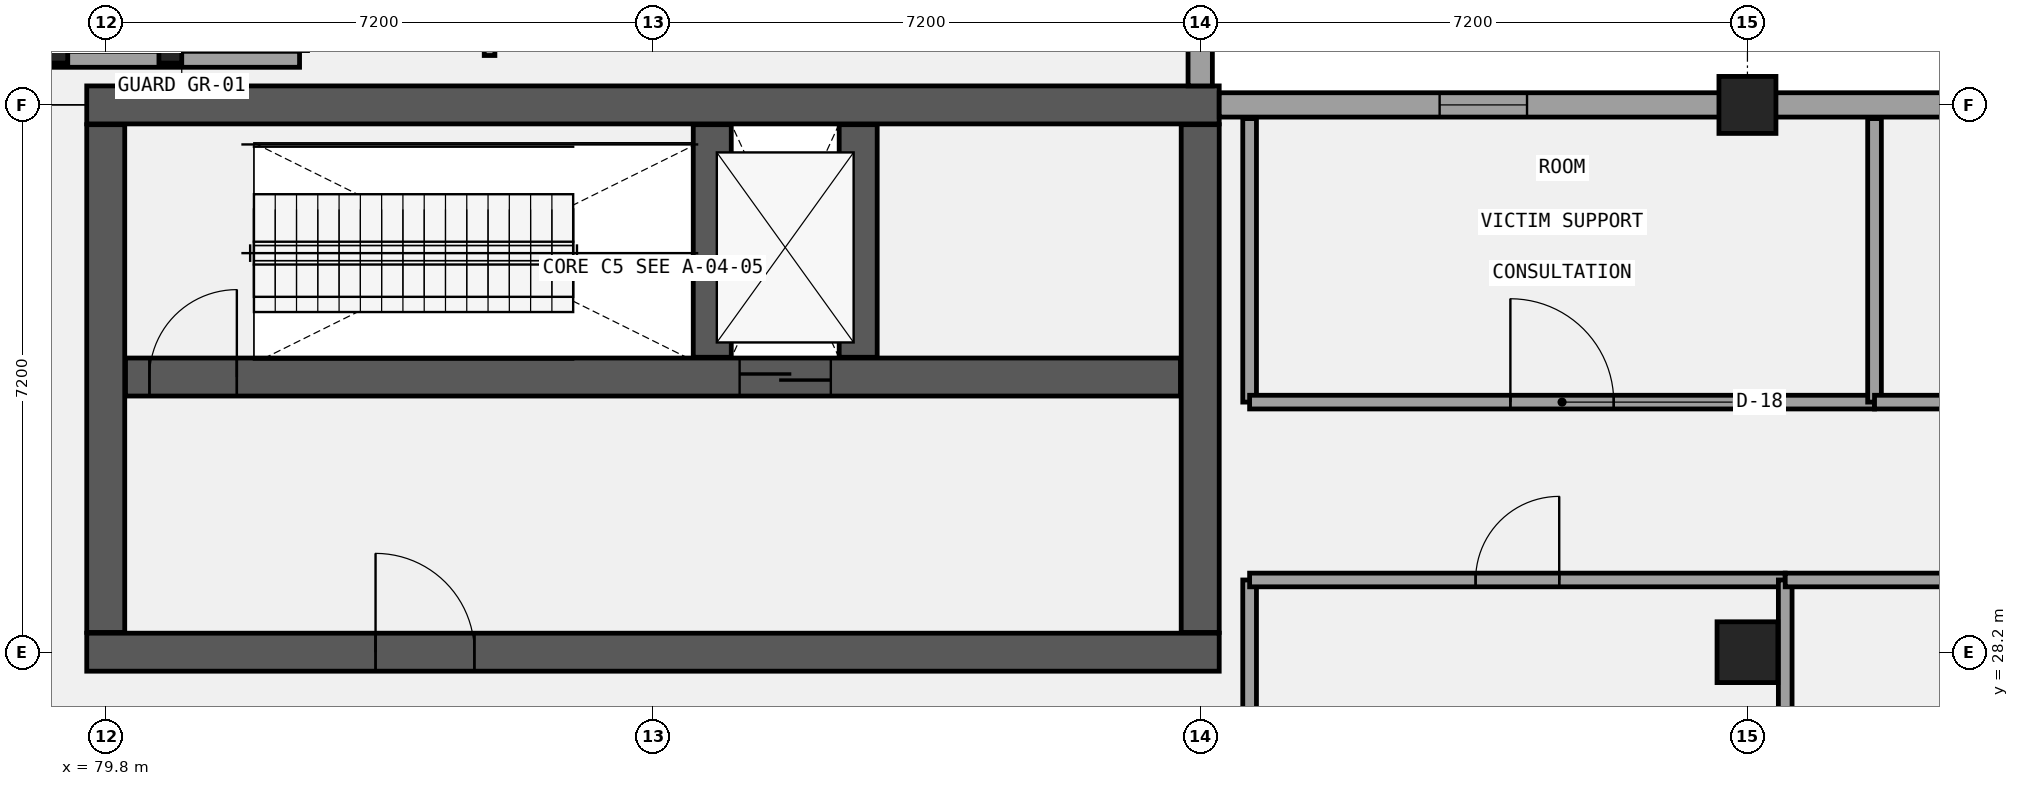
"""IFC4 building model, lengths in metres.
Left out: names, types, materials, properties, quantities, classifications, styles, units other than length and angle.
Written with IfcOpenShell. Run it as: python <this file> out.ifc"""

import sys

from ifc_helpers import new_model, si_unit, direction, frame, frame_2d, origin, origin_2d, place, context, subcontext, project, spatial, rectangle, i_section, extrude, element, fill, save


model = new_model("IFC4")
c1 = context("Model", 3, precision=1e-05, world=origin(), true_north=direction((0.0, 1.0)))
c2 = subcontext(c1, "Body", "Model", "MODEL_VIEW")
j1 = project(units=[si_unit("LENGTHUNIT", "METRE"), si_unit("PLANEANGLEUNIT", "RADIAN")], contexts=[c1])
p1 = place(None, origin())
s1 = spatial("IfcSite", under=j1, at=p1, CompositionType="ELEMENT")
p2 = place(p1, origin())
s2 = spatial("IfcBuilding", under=s1, at=p2, CompositionType="ELEMENT")
p3 = place(p2, origin())
s3 = spatial("IfcBuildingStorey", under=s2, at=p3, CompositionType="ELEMENT", Elevation=0.0)
p4 = place(p3, frame((79.55, 35.4, 0.0), z_axis=(0.0, 0.0, 1.0), x_axis=(1.0, 0.0, 0.0)))
e1 = element("IfcWall", 1, at=p4, inside=s3, PredefinedType="SHEAR", context=c2, shape_type="SweptSolid", body=[
    extrude(rectangle(XDim=14.9, YDim=0.5, at=frame_2d((7.45, 0.0))), origin(), (0.0, 0.0, 1.0), 5.4),
])
p5 = place(p3, frame((79.55, 28.2, 0.0), z_axis=(0.0, 0.0, 1.0), x_axis=(1.0, 0.0, 0.0)))
e2 = element("IfcWall", 2, at=p5, inside=s3, PredefinedType="SHEAR", context=c2, shape_type="SweptSolid", body=[
    extrude(rectangle(XDim=14.9, YDim=0.5, at=frame_2d((7.45, 0.0))), origin(), (0.0, 0.0, 1.0), 5.4),
])
p6 = place(p5, frame((3.8, 0.0, 0.0)))
e3 = element("IfcOpeningElement", 3, at=p6, cuts=e2, PredefinedType="OPENING", context=c2, shape_type="SweptSolid", body=[
    extrude(rectangle(XDim=1.3, YDim=2.2, at=frame_2d((0.65, 1.1))), frame((0.0, 0.26, 0.0), z_axis=(0.0, -1.0, 0.0), x_axis=(1.0, 0.0, 0.0)), (0.0, 0.0, 1.0), 0.52),
])
for number, where, z_axis, x_axis in (
    (4, (79.8, 28.46, 0.0), (0.0, 0.0, 1.0), (0.0, 1.0, 0.0)),
    (5, (94.2, 28.46, 0.0), (0.0, 0.0, 1.0), (0.0, 1.0, 0.0)),
):
    element("IfcWall", number, at=place(p3, frame(where, z_axis=z_axis, x_axis=x_axis)), inside=s3, PredefinedType="SHEAR", context=c2, shape_type="SweptSolid", body=[
        extrude(rectangle(XDim=6.68, YDim=0.5, at=frame_2d((3.34, 0.0))), origin(), (0.0, 0.0, 1.0), 5.4),
    ])
p7 = place(p3, frame((80.06, 31.82, 0.0), z_axis=(0.0, 0.0, 1.0), x_axis=(1.0, 0.0, 0.0)))
e6 = element("IfcWall", 6, at=p7, inside=s3, PredefinedType="SHEAR", context=c2, shape_type="SweptSolid", body=[
    extrude(rectangle(XDim=13.88, YDim=0.5, at=frame_2d((6.94, 0.0))), origin(), (0.0, 0.0, 1.0), 5.4),
])
p8 = place(p7, frame((8.08, 0.0, 0.0)))
e7 = element("IfcOpeningElement", 7, at=p8, cuts=e6, PredefinedType="OPENING", context=c2, shape_type="SweptSolid", body=[
    extrude(rectangle(XDim=1.2, YDim=2.15, at=frame_2d((0.6, 1.075))), frame((0.0, 0.26, 0.0), z_axis=(0.0, -1.0, 0.0), x_axis=(1.0, 0.0, 0.0)), (0.0, 0.0, 1.0), 0.52),
])
p9 = place(p7, frame((0.315, 0.0, 0.0)))
e8 = element("IfcOpeningElement", 8, at=p9, cuts=e6, PredefinedType="OPENING", context=c2, shape_type="SweptSolid", body=[
    extrude(rectangle(XDim=1.15, YDim=2.15, at=frame_2d((0.575, 1.075))), frame((0.0, 0.26, 0.0), z_axis=(0.0, -1.0, 0.0), x_axis=(1.0, 0.0, 0.0)), (0.0, 0.0, 1.0), 0.52),
])
for number, where, z_axis, x_axis in (
    (9, (87.78, 32.08, 0.0), (0.0, 0.0, 1.0), (0.0, 1.0, 0.0)),
    (10, (89.7, 32.08, 0.0), (0.0, 0.0, 1.0), (0.0, 1.0, 0.0)),
):
    element("IfcWall", number, at=place(p3, frame(where, z_axis=z_axis, x_axis=x_axis)), inside=s3, PredefinedType="SHEAR", context=c2, shape_type="SweptSolid", body=[
        extrude(rectangle(XDim=3.06, YDim=0.5, at=frame_2d((1.53, 0.0))), origin(), (0.0, 0.0, 1.0), 5.4),
    ])
p10 = place(p3, frame((101.4, 28.2, 0.0), z_axis=(0.0, 0.0, 1.0), x_axis=(1.0, 0.0, 0.0)))
e11 = element("IfcColumn", 11, at=p10, inside=s3, PredefinedType="COLUMN", context=c2, shape_type="SweptSolid", body=[
    extrude(rectangle(XDim=0.8, YDim=0.8, at=origin_2d()), origin(), (0.0, 0.0, 1.0), 5.4),
])
p11 = place(p3, frame((101.4, 35.4, 0.0), z_axis=(0.0, 0.0, 1.0), x_axis=(1.0, 0.0, 0.0)))
e12 = element("IfcColumn", 12, at=p11, inside=s3, PredefinedType="COLUMN", context=c2, shape_type="SweptSolid", body=[
    extrude(rectangle(XDim=0.75, YDim=0.75, at=origin_2d()), origin(), (0.0, 0.0, 1.0), 5.4),
])
for number, where, z_axis, x_axis in (
    (13, (79.15, 36.1, 0.0), (0.0, 0.0, 1.0), (1.0, 0.0, 0.0)),
    (14, (80.65, 36.1, 0.0), (0.0, 0.0, 1.0), (1.0, 0.0, 0.0)),
):
    element("IfcColumn", number, at=place(p3, frame(where, z_axis=z_axis, x_axis=x_axis)), inside=s3, PredefinedType="COLUMN", context=c2, shape_type="SweptSolid", body=[
        extrude(i_section(OverallWidth=0.3, OverallDepth=0.3, WebThickness=0.011, FlangeThickness=0.019, FilletRadius=0.027, at=origin_2d()), origin(), (0.0, 0.0, 1.0), 2.5),
    ])
p12 = place(p3, frame((94.2, 35.65, 0.0), z_axis=(0.0, 0.0, 1.0), x_axis=(0.0, 1.0, 0.0)))
e15 = element("IfcWall", 15, at=p12, inside=s3, PredefinedType="SOLIDWALL", context=c2, shape_type="SweptSolid", body=[
    extrude(rectangle(XDim=42.79, YDim=0.32, at=frame_2d((21.395, 0.0))), origin(), (0.0, 0.0, 1.0), 4.12),
])
p13 = place(p12, frame((2.975, 0.0, 1.0)))
e16 = element("IfcOpeningElement", 16, at=p13, cuts=e15, PredefinedType="OPENING", context=c2, shape_type="SweptSolid", body=[
    extrude(rectangle(XDim=1.0, YDim=1.65, at=frame_2d((0.5, 0.825))), frame((0.0, 0.17, 0.0), z_axis=(0.0, -1.0, 0.0), x_axis=(1.0, 0.0, 0.0)), (0.0, 0.0, 1.0), 0.34),
])
p14 = place(p12, frame((10.05, 0.0, 1.0)))
e17 = element("IfcOpeningElement", 17, at=p14, cuts=e15, PredefinedType="OPENING", context=c2, shape_type="SweptSolid", body=[
    extrude(rectangle(XDim=1.0, YDim=1.65, at=frame_2d((0.5, 0.825))), frame((0.0, 0.17, 0.0), z_axis=(0.0, -1.0, 0.0), x_axis=(1.0, 0.0, 0.0)), (0.0, 0.0, 1.0), 0.34),
])
p15 = place(p12, frame((17.25, 0.0, 1.0)))
e18 = element("IfcOpeningElement", 18, at=p15, cuts=e15, PredefinedType="OPENING", context=c2, shape_type="SweptSolid", body=[
    extrude(rectangle(XDim=1.0, YDim=1.65, at=frame_2d((0.5, 0.825))), frame((0.0, 0.17, 0.0), z_axis=(0.0, -1.0, 0.0), x_axis=(1.0, 0.0, 0.0)), (0.0, 0.0, 1.0), 0.34),
])
p16 = place(p12, frame((24.45, 0.0, 1.0)))
e19 = element("IfcOpeningElement", 19, at=p16, cuts=e15, PredefinedType="OPENING", context=c2, shape_type="SweptSolid", body=[
    extrude(rectangle(XDim=1.0, YDim=1.65, at=frame_2d((0.5, 0.825))), frame((0.0, 0.17, 0.0), z_axis=(0.0, -1.0, 0.0), x_axis=(1.0, 0.0, 0.0)), (0.0, 0.0, 1.0), 0.34),
])
p17 = place(p12, frame((31.65, 0.0, 1.0)))
e20 = element("IfcOpeningElement", 20, at=p17, cuts=e15, PredefinedType="OPENING", context=c2, shape_type="SweptSolid", body=[
    extrude(rectangle(XDim=1.0, YDim=1.65, at=frame_2d((0.5, 0.825))), frame((0.0, 0.17, 0.0), z_axis=(0.0, -1.0, 0.0), x_axis=(1.0, 0.0, 0.0)), (0.0, 0.0, 1.0), 0.34),
])
p18 = place(p12, frame((38.77, 0.0, 1.0)))
e21 = element("IfcOpeningElement", 21, at=p18, cuts=e15, PredefinedType="OPENING", context=c2, shape_type="SweptSolid", body=[
    extrude(rectangle(XDim=1.0, YDim=1.65, at=frame_2d((0.5, 0.825))), frame((0.0, 0.17, 0.0), z_axis=(0.0, -1.0, 0.0), x_axis=(1.0, 0.0, 0.0)), (0.0, 0.0, 1.0), 0.34),
])
p19 = place(p3, frame((144.76, 35.4, 0.0), z_axis=(0.0, 0.0, 1.0), x_axis=(-1.0, 0.0, 0.0)))
e22 = element("IfcWall", 22, at=p19, inside=s3, PredefinedType="SOLIDWALL", context=c2, shape_type="SweptSolid", body=[
    extrude(rectangle(XDim=50.31, YDim=0.32, at=frame_2d((25.155, 0.0))), origin(), (0.0, 0.0, 1.0), 4.12),
])
p20 = place(p19, frame((46.26, 0.0, 1.0)))
e23 = element("IfcOpeningElement", 23, at=p20, cuts=e22, PredefinedType="OPENING", context=c2, shape_type="SweptSolid", body=[
    extrude(rectangle(XDim=1.15, YDim=1.4, at=frame_2d((0.575, 0.7))), frame((0.0, 0.17, 0.0), z_axis=(0.0, -1.0, 0.0), x_axis=(1.0, 0.0, 0.0)), (0.0, 0.0, 1.0), 0.34),
])
p21 = place(p19, frame((39.185, 0.0, 1.0)))
e24 = element("IfcOpeningElement", 24, at=p21, cuts=e22, PredefinedType="OPENING", context=c2, shape_type="SweptSolid", body=[
    extrude(rectangle(XDim=1.15, YDim=1.4, at=frame_2d((0.575, 0.7))), frame((0.0, 0.17, 0.0), z_axis=(0.0, -1.0, 0.0), x_axis=(1.0, 0.0, 0.0)), (0.0, 0.0, 1.0), 0.34),
])
p22 = place(p19, frame((31.985, 0.0, 1.0)))
e25 = element("IfcOpeningElement", 25, at=p22, cuts=e22, PredefinedType="OPENING", context=c2, shape_type="SweptSolid", body=[
    extrude(rectangle(XDim=1.15, YDim=1.4, at=frame_2d((0.575, 0.7))), frame((0.0, 0.17, 0.0), z_axis=(0.0, -1.0, 0.0), x_axis=(1.0, 0.0, 0.0)), (0.0, 0.0, 1.0), 0.34),
])
p23 = place(p19, frame((24.785, 0.0, 1.0)))
e26 = element("IfcOpeningElement", 26, at=p23, cuts=e22, PredefinedType="OPENING", context=c2, shape_type="SweptSolid", body=[
    extrude(rectangle(XDim=1.15, YDim=1.4, at=frame_2d((0.575, 0.7))), frame((0.0, 0.17, 0.0), z_axis=(0.0, -1.0, 0.0), x_axis=(1.0, 0.0, 0.0)), (0.0, 0.0, 1.0), 0.34),
])
p24 = place(p19, frame((17.585, 0.0, 1.0)))
e27 = element("IfcOpeningElement", 27, at=p24, cuts=e22, PredefinedType="OPENING", context=c2, shape_type="SweptSolid", body=[
    extrude(rectangle(XDim=1.15, YDim=1.4, at=frame_2d((0.575, 0.7))), frame((0.0, 0.17, 0.0), z_axis=(0.0, -1.0, 0.0), x_axis=(1.0, 0.0, 0.0)), (0.0, 0.0, 1.0), 0.34),
])
p25 = place(p19, frame((10.385, 0.0, 1.0)))
e28 = element("IfcOpeningElement", 28, at=p25, cuts=e22, PredefinedType="OPENING", context=c2, shape_type="SweptSolid", body=[
    extrude(rectangle(XDim=1.15, YDim=1.4, at=frame_2d((0.575, 0.7))), frame((0.0, 0.17, 0.0), z_axis=(0.0, -1.0, 0.0), x_axis=(1.0, 0.0, 0.0)), (0.0, 0.0, 1.0), 0.34),
])
p26 = place(p19, frame((3.185, 0.0, 1.0)))
e29 = element("IfcOpeningElement", 29, at=p26, cuts=e22, PredefinedType="OPENING", context=c2, shape_type="SweptSolid", body=[
    extrude(rectangle(XDim=1.15, YDim=1.4, at=frame_2d((0.575, 0.7))), frame((0.0, 0.17, 0.0), z_axis=(0.0, -1.0, 0.0), x_axis=(1.0, 0.0, 0.0)), (0.0, 0.0, 1.0), 0.34),
])
p27 = place(p3, frame((74.75, 36.0, 0.0), z_axis=(0.0, 0.0, 1.0), x_axis=(1.0, 0.0, 0.0)))
e30 = element("IfcWall", 30, at=p27, inside=s3, PredefinedType="PARTITIONING", context=c2, shape_type="SweptSolid", body=[
    extrude(rectangle(XDim=7.6, YDim=0.21, at=frame_2d((3.8, 0.0))), origin(), (0.0, 0.0, 1.0), 5.12),
])
p28 = place(p3, frame((84.85, 36.05, 0.0), z_axis=(0.0, 0.0, 1.0), x_axis=(0.0, 1.0, 0.0)))
e31 = element("IfcWall", 31, at=p28, inside=s3, PredefinedType="PARTITIONING", context=c2, shape_type="SweptSolid", body=[
    extrude(rectangle(XDim=3.83, YDim=0.14, at=frame_2d((1.915, 0.0))), origin(), (0.0, 0.0, 1.0), 5.12),
])
p29 = place(p3, frame((94.85, 21.18, 0.0), z_axis=(0.0, 0.0, 1.0), x_axis=(0.0, 1.0, 0.0)))
e32 = element("IfcWall", 32, at=p29, inside=s3, PredefinedType="PARTITIONING", context=c2, shape_type="SweptSolid", body=[
    extrude(rectangle(XDim=7.97, YDim=0.18, at=frame_2d((3.985, 0.0))), origin(), (0.0, 0.0, 1.0), 5.12),
])
p30 = place(p3, frame((94.85, 29.15, 0.0), z_axis=(0.0, 0.0, 1.0), x_axis=(1.0, 0.0, 0.0)))
e33 = element("IfcWall", 33, at=p30, inside=s3, PredefinedType="PARTITIONING", context=c2, shape_type="SweptSolid", body=[
    extrude(rectangle(XDim=7.047, YDim=0.18, at=frame_2d((3.523, 0.0))), origin(), (0.0, 0.0, 1.0), 5.12),
])
p31 = place(p30, frame((2.973, 0.0, 0.0)))
e34 = element("IfcOpeningElement", 34, at=p31, cuts=e33, PredefinedType="OPENING", context=c2, shape_type="SweptSolid", body=[
    extrude(rectangle(XDim=1.1, YDim=2.22, at=frame_2d((0.55, 1.11))), frame((0.0, 0.1, 0.0), z_axis=(0.0, -1.0, 0.0), x_axis=(1.0, 0.0, 0.0)), (0.0, 0.0, 1.0), 0.2),
])
p32 = place(p3, frame((101.897, 21.18, 0.0), z_axis=(0.0, 0.0, 1.0), x_axis=(0.0, 1.0, 0.0)))
e35 = element("IfcWall", 35, at=p32, inside=s3, PredefinedType="PARTITIONING", context=c2, shape_type="SweptSolid", body=[
    extrude(rectangle(XDim=7.97, YDim=0.18, at=frame_2d((3.985, 0.0))), origin(), (0.0, 0.0, 1.0), 5.12),
])
p33 = place(p3, frame((101.897, 29.15, 0.0), z_axis=(0.0, 0.0, 1.0), x_axis=(1.0, 0.0, 0.0)))
e36 = element("IfcWall", 36, at=p33, inside=s3, PredefinedType="PARTITIONING", context=c2, shape_type="SweptSolid", body=[
    extrude(rectangle(XDim=7.047, YDim=0.18, at=frame_2d((3.523, 0.0))), origin(), (0.0, 0.0, 1.0), 5.12),
])
p34 = place(p33, frame((2.973, 0.0, 0.0)))
e37 = element("IfcOpeningElement", 37, at=p34, cuts=e36, PredefinedType="OPENING", context=c2, shape_type="SweptSolid", body=[
    extrude(rectangle(XDim=1.1, YDim=2.35, at=frame_2d((0.55, 1.175))), frame((0.0, 0.1, 0.0), z_axis=(0.0, -1.0, 0.0), x_axis=(1.0, 0.0, 0.0)), (0.0, 0.0, 1.0), 0.2),
])
p35 = place(p3, frame((94.85, 31.49, 0.0), z_axis=(0.0, 0.0, 1.0), x_axis=(0.0, 1.0, 0.0)))
e38 = element("IfcWall", 38, at=p35, inside=s3, PredefinedType="PARTITIONING", context=c2, shape_type="SweptSolid", body=[
    extrude(rectangle(XDim=3.73, YDim=0.18, at=frame_2d((1.865, 0.0))), origin(), (0.0, 0.0, 1.0), 5.12),
])
p36 = place(p3, frame((94.85, 31.49, 0.0), z_axis=(0.0, 0.0, 1.0), x_axis=(1.0, 0.0, 0.0)))
e39 = element("IfcWall", 39, at=p36, inside=s3, PredefinedType="PARTITIONING", context=c2, shape_type="SweptSolid", body=[
    extrude(rectangle(XDim=8.222, YDim=0.18, at=frame_2d((4.111, 0.0))), origin(), (0.0, 0.0, 1.0), 5.12),
])
p37 = place(p36, frame((3.431, 0.0, 0.0)))
e40 = element("IfcOpeningElement", 40, at=p37, cuts=e39, PredefinedType="OPENING", context=c2, shape_type="SweptSolid", body=[
    extrude(rectangle(XDim=1.36, YDim=2.35, at=frame_2d((0.68, 1.175))), frame((0.0, 0.1, 0.0), z_axis=(0.0, -1.0, 0.0), x_axis=(1.0, 0.0, 0.0)), (0.0, 0.0, 1.0), 0.2),
])
p38 = place(p3, frame((103.072, 31.49, 0.0), z_axis=(0.0, 0.0, 1.0), x_axis=(0.0, 1.0, 0.0)))
e41 = element("IfcWall", 41, at=p38, inside=s3, PredefinedType="PARTITIONING", context=c2, shape_type="SweptSolid", body=[
    extrude(rectangle(XDim=3.73, YDim=0.18, at=frame_2d((1.865, 0.0))), origin(), (0.0, 0.0, 1.0), 5.12),
])
p39 = place(p3, frame((103.072, 31.49, 0.0), z_axis=(0.0, 0.0, 1.0), x_axis=(1.0, 0.0, 0.0)))
e42 = element("IfcWall", 42, at=p39, inside=s3, PredefinedType="PARTITIONING", context=c2, shape_type="SweptSolid", body=[
    extrude(rectangle(XDim=7.371, YDim=0.18, at=frame_2d((3.686, 0.0))), origin(), (0.0, 0.0, 1.0), 5.12),
])
p40 = place(p39, frame((2.926, 0.0, 0.0)))
e43 = element("IfcOpeningElement", 43, at=p40, cuts=e42, PredefinedType="OPENING", context=c2, shape_type="SweptSolid", body=[
    extrude(rectangle(XDim=1.52, YDim=2.1, at=frame_2d((0.76, 1.05))), frame((0.0, 0.1, 0.0), z_axis=(0.0, -1.0, 0.0), x_axis=(1.0, 0.0, 0.0)), (0.0, 0.0, 1.0), 0.2),
])
p41 = place(p8, frame((1.2, 0.0, 0.0), z_axis=(0.0, 0.0, 1.0), x_axis=(-1.0, 0.0, 0.0)))
e44 = element("IfcDoor", 44, at=p41, inside=s3, OperationType="DOUBLE_DOOR_SLIDING", PredefinedType="DOOR", context=c2, shape_type="SweptSolid", body=[
    extrude(rectangle(XDim=1.2, YDim=2.15, at=frame_2d((0.6, 1.075))), frame((0.0, 0.025, 0.0), z_axis=(0.0, -1.0, 0.0), x_axis=(1.0, 0.0, 0.0)), (0.0, 0.0, 1.0), 0.05),
])
fill(e7, e44)
p42 = place(p9, origin())
e45 = element("IfcDoor", 45, at=p42, inside=s3, OperationType="SINGLE_SWING_RIGHT", PredefinedType="DOOR", context=c2, shape_type="SweptSolid", body=[
    extrude(rectangle(XDim=1.15, YDim=2.15, at=frame_2d((0.575, 1.075))), frame((0.0, 0.025, 0.0), z_axis=(0.0, -1.0, 0.0), x_axis=(1.0, 0.0, 0.0)), (0.0, 0.0, 1.0), 0.05),
])
fill(e8, e45)
p43 = place(p6, frame((1.3, 0.0, 0.0), z_axis=(0.0, 0.0, 1.0), x_axis=(-1.0, 0.0, 0.0)))
e46 = element("IfcDoor", 46, at=p43, inside=s3, OperationType="SINGLE_SWING_LEFT", PredefinedType="DOOR", context=c2, shape_type="SweptSolid", body=[
    extrude(rectangle(XDim=1.3, YDim=2.2, at=frame_2d((0.65, 1.1))), frame((0.0, 0.025, 0.0), z_axis=(0.0, -1.0, 0.0), x_axis=(1.0, 0.0, 0.0)), (0.0, 0.0, 1.0), 0.05),
])
fill(e3, e46)
p44 = place(p20, origin())
e47 = element("IfcWindow", 47, at=p44, inside=s3, PartitioningType="SINGLE_PANEL", PredefinedType="WINDOW", context=c2, shape_type="SweptSolid", body=[
    extrude(rectangle(XDim=1.15, YDim=1.4, at=frame_2d((0.575, 0.7))), frame((0.0, 0.03, 0.0), z_axis=(0.0, -1.0, 0.0), x_axis=(1.0, 0.0, 0.0)), (0.0, 0.0, 1.0), 0.06),
])
fill(e23, e47)
p45 = place(p31, frame((1.1, 0.0, 0.0), z_axis=(0.0, 0.0, 1.0), x_axis=(-1.0, 0.0, 0.0)))
e48 = element("IfcDoor", 48, at=p45, inside=s3, OperationType="SINGLE_SWING_RIGHT", PredefinedType="DOOR", context=c2, shape_type="SweptSolid", body=[
    extrude(rectangle(XDim=1.1, YDim=2.22, at=frame_2d((0.55, 1.11))), frame((0.0, 0.025, 0.0), z_axis=(0.0, -1.0, 0.0), x_axis=(1.0, 0.0, 0.0)), (0.0, 0.0, 1.0), 0.05),
])
fill(e34, e48)
p46 = place(p37, origin())
e49 = element("IfcDoor", 49, at=p46, inside=s3, OperationType="SINGLE_SWING_LEFT", PredefinedType="DOOR", context=c2, shape_type="SweptSolid", body=[
    extrude(rectangle(XDim=1.36, YDim=2.35, at=frame_2d((0.68, 1.175))), frame((0.0, 0.025, 0.0), z_axis=(0.0, -1.0, 0.0), x_axis=(1.0, 0.0, 0.0)), (0.0, 0.0, 1.0), 0.05),
])
fill(e40, e49)
save(model, sys.argv[1])
